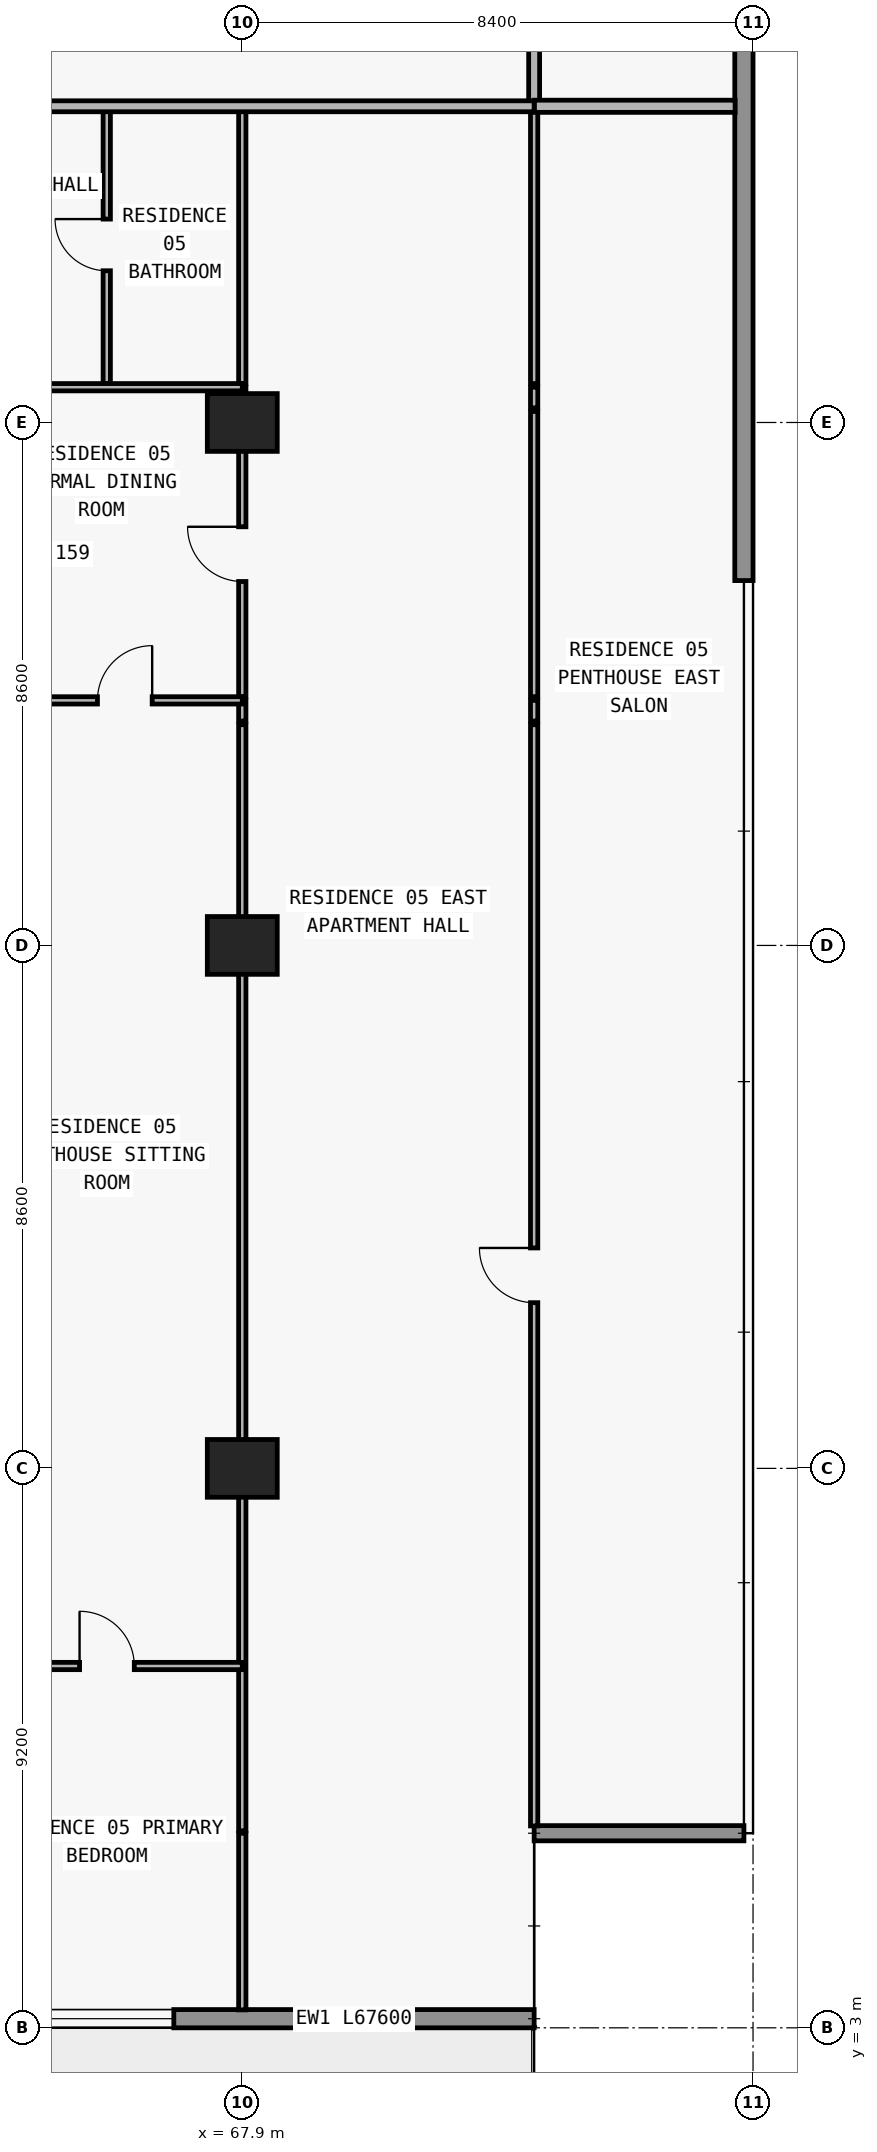
"""IFC4 building model, lengths in metres.
Left out: names, types, materials, properties, quantities, classifications, styles, units other than length and angle.
Written with IfcOpenShell. Run it as: python <this file> out.ifc"""

import sys

from ifc_helpers import new_model, si_unit, direction, frame, frame_2d, origin, origin_2d, place, context, subcontext, project, spatial, rectangle, extrude, element, fill, save


model = new_model("IFC4")
c1 = context("Model", 3, precision=1e-05, world=origin(), true_north=direction((0.0, 1.0)))
c2 = subcontext(c1, "Body", "Model", "MODEL_VIEW")
j1 = project(units=[si_unit("LENGTHUNIT", "METRE"), si_unit("PLANEANGLEUNIT", "RADIAN")], contexts=[c1])
p1 = place(None, origin())
s1 = spatial("IfcSite", under=j1, at=p1, CompositionType="ELEMENT")
p2 = place(p1, origin())
s2 = spatial("IfcBuilding", under=s1, at=p2, CompositionType="ELEMENT")
p3 = place(p2, frame((0.0, 0.0, 53.1)))
s3 = spatial("IfcBuildingStorey", under=s2, at=p3, CompositionType="ELEMENT", Elevation=53.1)
for number, where, z_axis, x_axis in (
    (1, (67.9, 12.2, 0.0), (0.0, 0.0, 1.0), (1.0, 0.0, 0.0)),
    (2, (67.9, 20.8, 0.0), (0.0, 0.0, 1.0), (1.0, 0.0, 0.0)),
    (3, (67.9, 29.4, 0.0), (0.0, 0.0, 1.0), (1.0, 0.0, 0.0)),
):
    element("IfcColumn", number, at=place(p3, frame(where, z_axis=z_axis, x_axis=x_axis)), inside=s3, PredefinedType="COLUMN", context=c2, shape_type="SweptSolid", body=[
        extrude(rectangle(XDim=1.15, YDim=0.95, at=origin_2d()), origin(), (0.0, 0.0, 1.0), 3.05),
    ])
p4 = place(p3, frame((72.7, 3.15, 0.0), z_axis=(0.0, 0.0, 1.0), x_axis=(-1.0, 0.0, 0.0)))
e4 = element("IfcWall", 4, at=p4, inside=s3, PredefinedType="STANDARD", context=c2, shape_type="SweptSolid", body=[
    extrude(rectangle(XDim=67.6, YDim=0.3, at=frame_2d((33.8, 0.0))), origin(), (0.0, 0.0, 1.0), 3.05),
])
p5 = place(p4, frame((59.826, 0.0, 0.0)))
e5 = element("IfcOpeningElement", 5, at=p5, cuts=e4, PredefinedType="OPENING", context=c2, shape_type="SweptSolid", body=[
    extrude(rectangle(XDim=2.0, YDim=2.3, at=frame_2d((1.0, 1.15))), frame((0.0, 0.16, 0.0), z_axis=(0.0, -1.0, 0.0), x_axis=(1.0, 0.0, 0.0)), (0.0, 0.0, 1.0), 0.32),
])
p6 = place(p4, frame((55.526, 0.0, 0.85)))
e6 = element("IfcOpeningElement", 6, at=p6, cuts=e4, PredefinedType="OPENING", context=c2, shape_type="SweptSolid", body=[
    extrude(rectangle(XDim=2.2, YDim=1.55, at=frame_2d((1.1, 0.775))), frame((0.0, 0.16, 0.0), z_axis=(0.0, -1.0, 0.0), x_axis=(1.0, 0.0, 0.0)), (0.0, 0.0, 1.0), 0.32),
])
p7 = place(p4, frame((51.09, 0.0, 0.0)))
e7 = element("IfcOpeningElement", 7, at=p7, cuts=e4, PredefinedType="OPENING", context=c2, shape_type="SweptSolid", body=[
    extrude(rectangle(XDim=2.0, YDim=2.3, at=frame_2d((1.0, 1.15))), frame((0.0, 0.16, 0.0), z_axis=(0.0, -1.0, 0.0), x_axis=(1.0, 0.0, 0.0)), (0.0, 0.0, 1.0), 0.32),
])
p8 = place(p4, frame((46.99, 0.0, 0.85)))
e8 = element("IfcOpeningElement", 8, at=p8, cuts=e4, PredefinedType="OPENING", context=c2, shape_type="SweptSolid", body=[
    extrude(rectangle(XDim=1.8, YDim=1.55, at=frame_2d((0.9, 0.775))), frame((0.0, 0.16, 0.0), z_axis=(0.0, -1.0, 0.0), x_axis=(1.0, 0.0, 0.0)), (0.0, 0.0, 1.0), 0.32),
])
p9 = place(p4, frame((43.09, 0.0, 0.0)))
e9 = element("IfcOpeningElement", 9, at=p9, cuts=e4, PredefinedType="OPENING", context=c2, shape_type="SweptSolid", body=[
    extrude(rectangle(XDim=2.0, YDim=2.3, at=frame_2d((1.0, 1.15))), frame((0.0, 0.16, 0.0), z_axis=(0.0, -1.0, 0.0), x_axis=(1.0, 0.0, 0.0)), (0.0, 0.0, 1.0), 0.32),
])
p10 = place(p4, frame((38.41, 0.0, 0.65)))
e10 = element("IfcOpeningElement", 10, at=p10, cuts=e4, PredefinedType="OPENING", context=c2, shape_type="SweptSolid", body=[
    extrude(rectangle(XDim=2.6, YDim=1.85, at=frame_2d((1.3, 0.925))), frame((0.0, 0.16, 0.0), z_axis=(0.0, -1.0, 0.0), x_axis=(1.0, 0.0, 0.0)), (0.0, 0.0, 1.0), 0.32),
])
p11 = place(p4, frame((32.7, 0.0, 0.85)))
e11 = element("IfcOpeningElement", 11, at=p11, cuts=e4, PredefinedType="OPENING", context=c2, shape_type="SweptSolid", body=[
    extrude(rectangle(XDim=2.2, YDim=1.55, at=frame_2d((1.1, 0.775))), frame((0.0, 0.16, 0.0), z_axis=(0.0, -1.0, 0.0), x_axis=(1.0, 0.0, 0.0)), (0.0, 0.0, 1.0), 0.32),
])
p12 = place(p4, frame((24.7, 0.0, 0.85)))
e12 = element("IfcOpeningElement", 12, at=p12, cuts=e4, PredefinedType="OPENING", context=c2, shape_type="SweptSolid", body=[
    extrude(rectangle(XDim=2.2, YDim=1.55, at=frame_2d((1.1, 0.775))), frame((0.0, 0.16, 0.0), z_axis=(0.0, -1.0, 0.0), x_axis=(1.0, 0.0, 0.0)), (0.0, 0.0, 1.0), 0.32),
])
p13 = place(p4, frame((18.29, 0.0, 0.0)))
e13 = element("IfcOpeningElement", 13, at=p13, cuts=e4, PredefinedType="OPENING", context=c2, shape_type="SweptSolid", body=[
    extrude(rectangle(XDim=2.0, YDim=2.3, at=frame_2d((1.0, 1.15))), frame((0.0, 0.16, 0.0), z_axis=(0.0, -1.0, 0.0), x_axis=(1.0, 0.0, 0.0)), (0.0, 0.0, 1.0), 0.32),
])
p14 = place(p4, frame((14.19, 0.0, 0.85)))
e14 = element("IfcOpeningElement", 14, at=p14, cuts=e4, PredefinedType="OPENING", context=c2, shape_type="SweptSolid", body=[
    extrude(rectangle(XDim=1.8, YDim=1.55, at=frame_2d((0.9, 0.775))), frame((0.0, 0.16, 0.0), z_axis=(0.0, -1.0, 0.0), x_axis=(1.0, 0.0, 0.0)), (0.0, 0.0, 1.0), 0.32),
])
p15 = place(p4, frame((10.226, 0.0, 0.0)))
e15 = element("IfcOpeningElement", 15, at=p15, cuts=e4, PredefinedType="OPENING", context=c2, shape_type="SweptSolid", body=[
    extrude(rectangle(XDim=2.0, YDim=2.3, at=frame_2d((1.0, 1.15))), frame((0.0, 0.16, 0.0), z_axis=(0.0, -1.0, 0.0), x_axis=(1.0, 0.0, 0.0)), (0.0, 0.0, 1.0), 0.32),
])
p16 = place(p4, frame((5.926, 0.0, 0.85)))
e16 = element("IfcOpeningElement", 16, at=p16, cuts=e4, PredefinedType="OPENING", context=c2, shape_type="SweptSolid", body=[
    extrude(rectangle(XDim=2.2, YDim=1.55, at=frame_2d((1.1, 0.775))), frame((0.0, 0.16, 0.0), z_axis=(0.0, -1.0, 0.0), x_axis=(1.0, 0.0, 0.0)), (0.0, 0.0, 1.0), 0.32),
])
p17 = place(p3, frame((72.7, 6.2, 0.0), z_axis=(0.0, 0.0, 1.0), x_axis=(1.0, 0.0, 0.0)))
e17 = element("IfcWall", 17, at=p17, inside=s3, PredefinedType="ELEMENTEDWALL", context=c2, shape_type="SweptSolid", body=[
    extrude(rectangle(XDim=3.45, YDim=0.25, at=frame_2d((1.725, 0.0))), origin(), (0.0, 0.0, 1.0), 3.05),
])
p18 = place(p3, frame((76.15, 47.4, 0.0), z_axis=(0.0, 0.0, 1.0), x_axis=(0.0, -1.0, 0.0)))
e18 = element("IfcWall", 18, at=p18, inside=s3, PredefinedType="STANDARD", context=c2, shape_type="SweptSolid", body=[
    extrude(rectangle(XDim=20.6, YDim=0.3, at=frame_2d((10.3, 0.0))), origin(), (0.0, 0.0, 1.0), 3.05),
])
p19 = place(p3, frame((65.671, 30.04, 0.0), z_axis=(0.0, 0.0, 1.0), x_axis=(0.0, 1.0, 0.0)))
e19 = element("IfcWall", 19, at=p19, inside=s3, PredefinedType="PARTITIONING", context=c2, shape_type="SweptSolid", body=[
    extrude(rectangle(XDim=4.56, YDim=0.12, at=frame_2d((2.28, 0.0))), origin(), (0.0, 0.0, 1.0), 2.578),
])
p20 = place(p19, frame((1.855, 0.0, 0.0)))
e20 = element("IfcOpeningElement", 20, at=p20, cuts=e19, PredefinedType="OPENING", context=c2, shape_type="SweptSolid", body=[
    extrude(rectangle(XDim=0.85, YDim=2.1, at=frame_2d((0.425, 1.05))), frame((0.0, 0.07, 0.0), z_axis=(0.0, -1.0, 0.0), x_axis=(1.0, 0.0, 0.0)), (0.0, 0.0, 1.0), 0.14),
])
p21 = place(p3, frame((67.9, 3.295, 0.0), z_axis=(0.0, 0.0, 1.0), x_axis=(0.0, 1.0, 0.0)))
e21 = element("IfcWall", 21, at=p21, inside=s3, PredefinedType="PARTITIONING", context=c2, shape_type="SweptSolid", body=[
    extrude(rectangle(XDim=2.905, YDim=0.12, at=frame_2d((1.453, 0.0))), origin(), (0.0, 0.0, 1.0), 3.05),
])
p22 = place(p3, frame((67.9, 6.24, 0.0), z_axis=(0.0, 0.0, 1.0), x_axis=(0.0, 1.0, 0.0)))
e22 = element("IfcWall", 22, at=p22, inside=s3, PredefinedType="PARTITIONING", context=c2, shape_type="SweptSolid", body=[
    extrude(rectangle(XDim=18.19, YDim=0.12, at=frame_2d((9.095, 0.0))), origin(), (0.0, 0.0, 1.0), 2.11),
])
p23 = place(p3, frame((67.9, 24.49, 0.0), z_axis=(0.0, 0.0, 1.0), x_axis=(0.0, 1.0, 0.0)))
e23 = element("IfcWall", 23, at=p23, inside=s3, PredefinedType="PARTITIONING", context=c2, shape_type="SweptSolid", body=[
    extrude(rectangle(XDim=0.34, YDim=0.12, at=frame_2d((0.17, 0.0))), origin(), (0.0, 0.0, 1.0), 2.11),
])
p24 = place(p3, frame((67.9, 24.89, 0.0), z_axis=(0.0, 0.0, 1.0), x_axis=(0.0, 1.0, 0.0)))
e24 = element("IfcWall", 24, at=p24, inside=s3, PredefinedType="PARTITIONING", context=c2, shape_type="SweptSolid", body=[
    extrude(rectangle(XDim=4.69, YDim=0.12, at=frame_2d((2.345, 0.0))), origin(), (0.0, 0.0, 1.0), 2.11),
])
p25 = place(p24, frame((1.895, 0.0, 0.0)))
e25 = element("IfcOpeningElement", 25, at=p25, cuts=e24, PredefinedType="OPENING", context=c2, shape_type="SweptSolid", body=[
    extrude(rectangle(XDim=0.9, YDim=2.06, at=frame_2d((0.45, 1.03))), frame((0.0, 0.07, 0.0), z_axis=(0.0, -1.0, 0.0), x_axis=(1.0, 0.0, 0.0)), (0.0, 0.0, 1.0), 0.14),
])
p26 = place(p3, frame((67.9, 29.64, 0.0), z_axis=(0.0, 0.0, 1.0), x_axis=(0.0, 1.0, 0.0)))
e26 = element("IfcWall", 26, at=p26, inside=s3, PredefinedType="PARTITIONING", context=c2, shape_type="SweptSolid", body=[
    extrude(rectangle(XDim=0.34, YDim=0.12, at=frame_2d((0.17, 0.0))), origin(), (0.0, 0.0, 1.0), 2.11),
])
p27 = place(p3, frame((67.9, 30.04, 0.0), z_axis=(0.0, 0.0, 1.0), x_axis=(0.0, 1.0, 0.0)))
e27 = element("IfcWall", 27, at=p27, inside=s3, PredefinedType="PARTITIONING", context=c2, shape_type="SweptSolid", body=[
    extrude(rectangle(XDim=4.56, YDim=0.12, at=frame_2d((2.28, 0.0))), origin(), (0.0, 0.0, 1.0), 2.11),
])
p28 = place(p3, frame((72.7, 6.32, 0.0), z_axis=(0.0, 0.0, 1.0), x_axis=(0.0, 1.0, 0.0)))
e28 = element("IfcWall", 28, at=p28, inside=s3, PredefinedType="PARTITIONING", context=c2, shape_type="SweptSolid", body=[
    extrude(rectangle(XDim=18.11, YDim=0.12, at=frame_2d((9.055, 0.0))), origin(), (0.0, 0.0, 1.0), 3.05),
])
p29 = place(p28, frame((8.605, 0.0, 0.0)))
e29 = element("IfcOpeningElement", 29, at=p29, cuts=e28, PredefinedType="OPENING", context=c2, shape_type="SweptSolid", body=[
    extrude(rectangle(XDim=0.9, YDim=2.15, at=frame_2d((0.45, 1.075))), frame((0.0, 0.07, 0.0), z_axis=(0.0, -1.0, 0.0), x_axis=(1.0, 0.0, 0.0)), (0.0, 0.0, 1.0), 0.14),
])
p30 = place(p3, frame((72.7, 24.49, 0.0), z_axis=(0.0, 0.0, 1.0), x_axis=(0.0, 1.0, 0.0)))
e30 = element("IfcWall", 30, at=p30, inside=s3, PredefinedType="PARTITIONING", context=c2, shape_type="SweptSolid", body=[
    extrude(rectangle(XDim=0.34, YDim=0.12, at=frame_2d((0.17, 0.0))), origin(), (0.0, 0.0, 1.0), 3.05),
])
p31 = place(p3, frame((72.7, 24.89, 0.0), z_axis=(0.0, 0.0, 1.0), x_axis=(0.0, 1.0, 0.0)))
e31 = element("IfcWall", 31, at=p31, inside=s3, PredefinedType="PARTITIONING", context=c2, shape_type="SweptSolid", body=[
    extrude(rectangle(XDim=4.69, YDim=0.12, at=frame_2d((2.345, 0.0))), origin(), (0.0, 0.0, 1.0), 3.05),
])
p32 = place(p3, frame((72.7, 29.64, 0.0), z_axis=(0.0, 0.0, 1.0), x_axis=(0.0, 1.0, 0.0)))
e32 = element("IfcWall", 32, at=p32, inside=s3, PredefinedType="PARTITIONING", context=c2, shape_type="SweptSolid", body=[
    extrude(rectangle(XDim=0.34, YDim=0.12, at=frame_2d((0.17, 0.0))), origin(), (0.0, 0.0, 1.0), 3.05),
])
p33 = place(p3, frame((72.7, 30.04, 0.0), z_axis=(0.0, 0.0, 1.0), x_axis=(0.0, 1.0, 0.0)))
e33 = element("IfcWall", 33, at=p33, inside=s3, PredefinedType="PARTITIONING", context=c2, shape_type="SweptSolid", body=[
    extrude(rectangle(XDim=4.56, YDim=0.12, at=frame_2d((2.28, 0.0))), origin(), (0.0, 0.0, 1.0), 3.05),
])
p34 = place(p3, frame((72.7, 34.605, 0.0), z_axis=(0.0, 0.0, 1.0), x_axis=(0.0, 1.0, 0.0)))
e34 = element("IfcWall", 34, at=p34, inside=s3, PredefinedType="PARTITIONING", context=c2, shape_type="SweptSolid", body=[
    extrude(rectangle(XDim=2.295, YDim=0.18, at=frame_2d((1.147, 0.0))), origin(), (0.0, 0.0, 1.0), 3.05),
])
p35 = place(p3, frame((63.448, 8.95, 0.0), z_axis=(0.0, 0.0, 1.0), x_axis=(1.0, 0.0, 0.0)))
e35 = element("IfcWall", 35, at=p35, inside=s3, PredefinedType="PARTITIONING", context=c2, shape_type="SweptSolid", body=[
    extrude(rectangle(XDim=4.452, YDim=0.12, at=frame_2d((2.226, 0.0))), origin(), (0.0, 0.0, 1.0), 3.05),
])
p36 = place(p35, frame((1.776, 0.0, 0.0)))
e36 = element("IfcOpeningElement", 36, at=p36, cuts=e35, PredefinedType="OPENING", context=c2, shape_type="SweptSolid", body=[
    extrude(rectangle(XDim=0.9, YDim=2.15, at=frame_2d((0.45, 1.075))), frame((0.0, 0.07, 0.0), z_axis=(0.0, -1.0, 0.0), x_axis=(1.0, 0.0, 0.0)), (0.0, 0.0, 1.0), 0.14),
])
p37 = place(p3, frame((59.5, 24.83, 0.0), z_axis=(0.0, 0.0, 1.0), x_axis=(1.0, 0.0, 0.0)))
e37 = element("IfcWall", 37, at=p37, inside=s3, PredefinedType="PARTITIONING", context=c2, shape_type="SweptSolid", body=[
    extrude(rectangle(XDim=8.4, YDim=0.12, at=frame_2d((4.2, 0.0))), origin(), (0.0, 0.0, 1.0), 3.05),
])
p38 = place(p37, frame((1.524, 0.0, 0.0)))
e38 = element("IfcOpeningElement", 38, at=p38, cuts=e37, PredefinedType="OPENING", context=c2, shape_type="SweptSolid", body=[
    extrude(rectangle(XDim=0.9, YDim=2.15, at=frame_2d((0.45, 1.075))), frame((0.0, 0.07, 0.0), z_axis=(0.0, -1.0, 0.0), x_axis=(1.0, 0.0, 0.0)), (0.0, 0.0, 1.0), 0.14),
])
p39 = place(p37, frame((6.018, 0.0, 0.0)))
e39 = element("IfcOpeningElement", 39, at=p39, cuts=e37, PredefinedType="OPENING", context=c2, shape_type="SweptSolid", body=[
    extrude(rectangle(XDim=0.9, YDim=2.15, at=frame_2d((0.45, 1.075))), frame((0.0, 0.07, 0.0), z_axis=(0.0, -1.0, 0.0), x_axis=(1.0, 0.0, 0.0)), (0.0, 0.0, 1.0), 0.14),
])
p40 = place(p3, frame((59.5, 29.98, 0.0), z_axis=(0.0, 0.0, 1.0), x_axis=(1.0, 0.0, 0.0)))
e40 = element("IfcWall", 40, at=p40, inside=s3, PredefinedType="PARTITIONING", context=c2, shape_type="SweptSolid", body=[
    extrude(rectangle(XDim=8.4, YDim=0.12, at=frame_2d((4.2, 0.0))), origin(), (0.0, 0.0, 1.0), 3.05),
])
p41 = place(p40, frame((1.818, 0.0, 0.0)))
e41 = element("IfcOpeningElement", 41, at=p41, cuts=e40, PredefinedType="OPENING", context=c2, shape_type="SweptSolid", body=[
    extrude(rectangle(XDim=0.9, YDim=2.15, at=frame_2d((0.45, 1.075))), frame((0.0, 0.07, 0.0), z_axis=(0.0, -1.0, 0.0), x_axis=(1.0, 0.0, 0.0)), (0.0, 0.0, 1.0), 0.14),
])
p42 = place(p3, frame((5.105, 34.6, 0.0), z_axis=(0.0, 0.0, 1.0), x_axis=(1.0, 0.0, 0.0)))
e42 = element("IfcWall", 42, at=p42, inside=s3, PredefinedType="PARTITIONING", context=c2, shape_type="SweptSolid", body=[
    extrude(rectangle(XDim=67.595, YDim=0.18, at=frame_2d((33.797, 0.0))), origin(), (0.0, 0.0, 1.0), 3.05),
])
p43 = place(p42, frame((7.365, 0.0, 0.0)))
e43 = element("IfcOpeningElement", 43, at=p43, cuts=e42, PredefinedType="OPENING", context=c2, shape_type="SweptSolid", body=[
    extrude(rectangle(XDim=1.0, YDim=2.2, at=frame_2d((0.5, 1.1))), frame((0.0, 0.1, 0.0), z_axis=(0.0, -1.0, 0.0), x_axis=(1.0, 0.0, 0.0)), (0.0, 0.0, 1.0), 0.2),
])
p44 = place(p42, frame((15.927, 0.0, 0.0)))
e44 = element("IfcOpeningElement", 44, at=p44, cuts=e42, PredefinedType="OPENING", context=c2, shape_type="SweptSolid", body=[
    extrude(rectangle(XDim=1.0, YDim=2.2, at=frame_2d((0.5, 1.1))), frame((0.0, 0.1, 0.0), z_axis=(0.0, -1.0, 0.0), x_axis=(1.0, 0.0, 0.0)), (0.0, 0.0, 1.0), 0.2),
])
p45 = place(p42, frame((24.407, 0.0, 0.0)))
e45 = element("IfcOpeningElement", 45, at=p45, cuts=e42, PredefinedType="OPENING", context=c2, shape_type="SweptSolid", body=[
    extrude(rectangle(XDim=1.0, YDim=2.2, at=frame_2d((0.5, 1.1))), frame((0.0, 0.1, 0.0), z_axis=(0.0, -1.0, 0.0), x_axis=(1.0, 0.0, 0.0)), (0.0, 0.0, 1.0), 0.2),
])
p46 = place(p42, frame((48.739, 0.0, 0.0)))
e46 = element("IfcOpeningElement", 46, at=p46, cuts=e42, PredefinedType="OPENING", context=c2, shape_type="SweptSolid", body=[
    extrude(rectangle(XDim=1.0, YDim=2.2, at=frame_2d((0.5, 1.1))), frame((0.0, 0.1, 0.0), z_axis=(0.0, -1.0, 0.0), x_axis=(1.0, 0.0, 0.0)), (0.0, 0.0, 1.0), 0.2),
])
p47 = place(p42, frame((56.98, 0.0, 0.0)))
e47 = element("IfcOpeningElement", 47, at=p47, cuts=e42, PredefinedType="OPENING", context=c2, shape_type="SweptSolid", body=[
    extrude(rectangle(XDim=1.0, YDim=2.2, at=frame_2d((0.5, 1.1))), frame((0.0, 0.1, 0.0), z_axis=(0.0, -1.0, 0.0), x_axis=(1.0, 0.0, 0.0)), (0.0, 0.0, 1.0), 0.2),
])
p48 = place(p3, frame((72.705, 34.6, 0.0), z_axis=(0.0, 0.0, 1.0), x_axis=(1.0, 0.0, 0.0)))
e48 = element("IfcWall", 48, at=p48, inside=s3, PredefinedType="PARTITIONING", context=c2, shape_type="SweptSolid", body=[
    extrude(rectangle(XDim=3.3, YDim=0.2, at=frame_2d((1.65, 0.0))), origin(), (0.0, 0.0, 1.0), 3.05),
])
p49 = place(p16, origin())
e49 = element("IfcWindow", 49, at=p49, inside=s3, PartitioningType="SINGLE_PANEL", PredefinedType="WINDOW", context=c2, shape_type="SweptSolid", body=[
    extrude(rectangle(XDim=2.2, YDim=1.55, at=frame_2d((1.1, 0.775))), frame((0.0, 0.03, 0.0), z_axis=(0.0, -1.0, 0.0), x_axis=(1.0, 0.0, 0.0)), (0.0, 0.0, 1.0), 0.06),
])
fill(e16, e49)
p50 = place(p20, origin())
e50 = element("IfcDoor", 50, at=p50, inside=s3, OperationType="SINGLE_SWING_RIGHT", PredefinedType="DOOR", context=c2, shape_type="SweptSolid", body=[
    extrude(rectangle(XDim=0.85, YDim=2.1, at=frame_2d((0.425, 1.05))), frame((0.0, 0.025, 0.0), z_axis=(0.0, -1.0, 0.0), x_axis=(1.0, 0.0, 0.0)), (0.0, 0.0, 1.0), 0.05),
])
fill(e20, e50)
p51 = place(p39, origin())
e51 = element("IfcDoor", 51, at=p51, inside=s3, OperationType="SINGLE_SWING_RIGHT", PredefinedType="DOOR", context=c2, shape_type="SweptSolid", body=[
    extrude(rectangle(XDim=0.9, YDim=2.15, at=frame_2d((0.45, 1.075))), frame((0.0, 0.025, 0.0), z_axis=(0.0, -1.0, 0.0), x_axis=(1.0, 0.0, 0.0)), (0.0, 0.0, 1.0), 0.05),
])
fill(e39, e51)
p52 = place(p36, origin())
e52 = element("IfcDoor", 52, at=p52, inside=s3, OperationType="SINGLE_SWING_LEFT", PredefinedType="DOOR", context=c2, shape_type="SweptSolid", body=[
    extrude(rectangle(XDim=0.9, YDim=2.15, at=frame_2d((0.45, 1.075))), frame((0.0, 0.025, 0.0), z_axis=(0.0, -1.0, 0.0), x_axis=(1.0, 0.0, 0.0)), (0.0, 0.0, 1.0), 0.05),
])
fill(e36, e52)
p53 = place(p25, origin())
e53 = element("IfcDoor", 53, at=p53, inside=s3, OperationType="SINGLE_SWING_RIGHT", PredefinedType="DOOR", context=c2, shape_type="SweptSolid", body=[
    extrude(rectangle(XDim=0.9, YDim=2.06, at=frame_2d((0.45, 1.03))), frame((0.0, 0.025, 0.0), z_axis=(0.0, -1.0, 0.0), x_axis=(1.0, 0.0, 0.0)), (0.0, 0.0, 1.0), 0.05),
])
fill(e25, e53)
p54 = place(p29, origin())
e54 = element("IfcDoor", 54, at=p54, inside=s3, OperationType="SINGLE_SWING_RIGHT", PredefinedType="DOOR", context=c2, shape_type="SweptSolid", body=[
    extrude(rectangle(XDim=0.9, YDim=2.15, at=frame_2d((0.45, 1.075))), frame((0.0, 0.025, 0.0), z_axis=(0.0, -1.0, 0.0), x_axis=(1.0, 0.0, 0.0)), (0.0, 0.0, 1.0), 0.05),
])
fill(e29, e54)
save(model, sys.argv[1])
